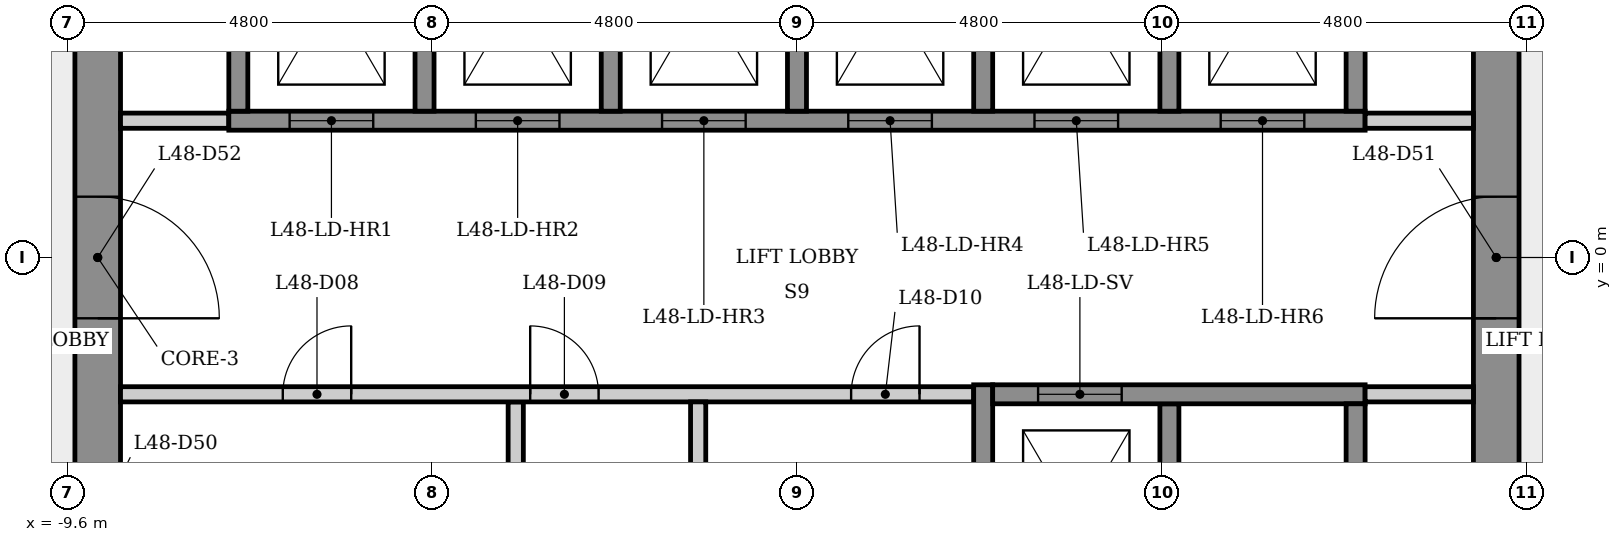
"""IFC4 building model, lengths in metres.
Left out: names, types, materials, properties, quantities, classifications, styles, units other than length and angle.
Written with IfcOpenShell. Run it as: python <this file> out.ifc"""

import sys

from ifc_helpers import new_model, si_unit, direction, frame, frame_2d, origin, place, context, subcontext, project, spatial, rectangle, extrude, element, fill, save


model = new_model("IFC4")
c1 = context("Model", 3, precision=1e-05, world=origin(), true_north=direction((0.0, 1.0)))
c2 = subcontext(c1, "Body", "Model", "MODEL_VIEW")
j1 = project(units=[si_unit("LENGTHUNIT", "METRE"), si_unit("PLANEANGLEUNIT", "RADIAN")], contexts=[c1])
p1 = place(None, origin())
s1 = spatial("IfcSite", under=j1, at=p1, CompositionType="ELEMENT")
p2 = place(p1, origin())
s2 = spatial("IfcBuilding", under=s1, at=p2, CompositionType="ELEMENT")
p3 = place(p2, frame((0.0, 0.0, 179.9)))
s3 = spatial("IfcBuildingStorey", under=s2, at=p3, CompositionType="ELEMENT", Elevation=179.9)
p4 = place(p3, frame((9.2, -5.485, 0.0), z_axis=(0.0, 0.0, 1.0), x_axis=(0.0, 1.0, 0.0)))
e1 = element("IfcWall", 1, at=p4, inside=s3, PredefinedType="SHEAR", context=c2, shape_type="SweptSolid", body=[
    extrude(rectangle(XDim=10.97, YDim=0.6, at=frame_2d((5.485, 0.0))), origin(), (0.0, 0.0, 1.0), 3.4),
])
p5 = place(p4, frame((4.685, 0.0, 0.0)))
e2 = element("IfcOpeningElement", 2, at=p5, cuts=e1, PredefinedType="OPENING", context=c2, shape_type="SweptSolid", body=[
    extrude(rectangle(XDim=1.6, YDim=2.1, at=frame_2d((0.8, 1.05))), frame((0.0, 0.31, 0.0), z_axis=(0.0, -1.0, 0.0), x_axis=(1.0, 0.0, 0.0)), (0.0, 0.0, 1.0), 0.62),
])
p6 = place(p3, frame((-9.2, 5.485, 0.0), z_axis=(0.0, 0.0, 1.0), x_axis=(0.0, -1.0, 0.0)))
e3 = element("IfcWall", 3, at=p6, inside=s3, PredefinedType="SHEAR", context=c2, shape_type="SweptSolid", body=[
    extrude(rectangle(XDim=10.97, YDim=0.6, at=frame_2d((5.485, 0.0))), origin(), (0.0, 0.0, 1.0), 3.4),
])
p7 = place(p6, frame((8.516, 0.0, 0.0)))
e4 = element("IfcOpeningElement", 4, at=p7, cuts=e3, PredefinedType="OPENING", context=c2, shape_type="SweptSolid", body=[
    extrude(rectangle(XDim=0.9, YDim=2.1, at=frame_2d((0.45, 1.05))), frame((0.0, 0.31, 0.0), z_axis=(0.0, -1.0, 0.0), x_axis=(1.0, 0.0, 0.0)), (0.0, 0.0, 1.0), 0.62),
])
p8 = place(p6, frame((4.685, 0.0, 0.0)))
e5 = element("IfcOpeningElement", 5, at=p8, cuts=e3, PredefinedType="OPENING", context=c2, shape_type="SweptSolid", body=[
    extrude(rectangle(XDim=1.6, YDim=2.1, at=frame_2d((0.8, 1.05))), frame((0.0, 0.31, 0.0), z_axis=(0.0, -1.0, 0.0), x_axis=(1.0, 0.0, 0.0)), (0.0, 0.0, 1.0), 0.62),
])
p9 = place(p3, frame((-8.9, 1.8, 0.0), z_axis=(0.0, 0.0, 1.0), x_axis=(1.0, 0.0, 0.0)))
e6 = element("IfcWall", 6, at=p9, inside=s3, PredefinedType="PARTITIONING", context=c2, shape_type="SweptSolid", body=[
    extrude(rectangle(XDim=1.425, YDim=0.2, at=frame_2d((0.712, 0.0))), origin(), (0.0, 0.0, 1.0), 3.05),
])
p10 = place(p3, frame((-7.475, 1.8, 0.0), z_axis=(0.0, 0.0, 1.0), x_axis=(1.0, 0.0, 0.0)))
e7 = element("IfcWall", 7, at=p10, inside=s3, PredefinedType="SHEAR", context=c2, shape_type="SweptSolid", body=[
    extrude(rectangle(XDim=14.95, YDim=0.25, at=frame_2d((7.475, 0.0))), origin(), (0.0, 0.0, 1.0), 3.05),
])
p11 = place(p10, frame((0.8, 0.0, 0.0)))
e8 = element("IfcOpeningElement", 8, at=p11, cuts=e7, PredefinedType="OPENING", context=c2, shape_type="SweptSolid", body=[
    extrude(rectangle(XDim=1.1, YDim=2.1, at=frame_2d((0.55, 1.05))), frame((0.0, 0.135, 0.0), z_axis=(0.0, -1.0, 0.0), x_axis=(1.0, 0.0, 0.0)), (0.0, 0.0, 1.0), 0.27),
])
p12 = place(p10, frame((3.25, 0.0, 0.0)))
e9 = element("IfcOpeningElement", 9, at=p12, cuts=e7, PredefinedType="OPENING", context=c2, shape_type="SweptSolid", body=[
    extrude(rectangle(XDim=1.1, YDim=2.1, at=frame_2d((0.55, 1.05))), frame((0.0, 0.135, 0.0), z_axis=(0.0, -1.0, 0.0), x_axis=(1.0, 0.0, 0.0)), (0.0, 0.0, 1.0), 0.27),
])
p13 = place(p10, frame((5.7, 0.0, 0.0)))
e10 = element("IfcOpeningElement", 10, at=p13, cuts=e7, PredefinedType="OPENING", context=c2, shape_type="SweptSolid", body=[
    extrude(rectangle(XDim=1.1, YDim=2.1, at=frame_2d((0.55, 1.05))), frame((0.0, 0.135, 0.0), z_axis=(0.0, -1.0, 0.0), x_axis=(1.0, 0.0, 0.0)), (0.0, 0.0, 1.0), 0.27),
])
p14 = place(p10, frame((8.15, 0.0, 0.0)))
e11 = element("IfcOpeningElement", 11, at=p14, cuts=e7, PredefinedType="OPENING", context=c2, shape_type="SweptSolid", body=[
    extrude(rectangle(XDim=1.1, YDim=2.1, at=frame_2d((0.55, 1.05))), frame((0.0, 0.135, 0.0), z_axis=(0.0, -1.0, 0.0), x_axis=(1.0, 0.0, 0.0)), (0.0, 0.0, 1.0), 0.27),
])
p15 = place(p10, frame((10.6, 0.0, 0.0)))
e12 = element("IfcOpeningElement", 12, at=p15, cuts=e7, PredefinedType="OPENING", context=c2, shape_type="SweptSolid", body=[
    extrude(rectangle(XDim=1.1, YDim=2.1, at=frame_2d((0.55, 1.05))), frame((0.0, 0.135, 0.0), z_axis=(0.0, -1.0, 0.0), x_axis=(1.0, 0.0, 0.0)), (0.0, 0.0, 1.0), 0.27),
])
p16 = place(p10, frame((13.05, 0.0, 0.0)))
e13 = element("IfcOpeningElement", 13, at=p16, cuts=e7, PredefinedType="OPENING", context=c2, shape_type="SweptSolid", body=[
    extrude(rectangle(XDim=1.1, YDim=2.1, at=frame_2d((0.55, 1.05))), frame((0.0, 0.135, 0.0), z_axis=(0.0, -1.0, 0.0), x_axis=(1.0, 0.0, 0.0)), (0.0, 0.0, 1.0), 0.27),
])
p17 = place(p3, frame((-7.35, 1.925, 0.0), z_axis=(0.0, 0.0, 1.0), x_axis=(0.0, 1.0, 0.0)))
e14 = element("IfcWall", 14, at=p17, inside=s3, PredefinedType="SHEAR", context=c2, shape_type="SweptSolid", body=[
    extrude(rectangle(XDim=4.036, YDim=0.25, at=frame_2d((2.018, 0.0))), origin(), (0.0, 0.0, 1.0), 3.05),
])
p18 = place(p3, frame((-4.9, 5.025, 0.0), z_axis=(0.0, 0.0, 1.0), x_axis=(0.0, -1.0, 0.0)))
e15 = element("IfcWall", 15, at=p18, inside=s3, PredefinedType="SHEAR", context=c2, shape_type="SweptSolid", body=[
    extrude(rectangle(XDim=3.1, YDim=0.25, at=frame_2d((1.55, 0.0))), origin(), (0.0, 0.0, 1.0), 3.4),
])
p19 = place(p3, frame((-3.7, -1.9, 0.0), z_axis=(0.0, 0.0, 1.0), x_axis=(0.0, -1.0, 0.0)))
e16 = element("IfcWall", 16, at=p19, inside=s3, PredefinedType="PARTITIONING", context=c2, shape_type="SweptSolid", body=[
    extrude(rectangle(XDim=3.15, YDim=0.2, at=frame_2d((1.575, 0.0))), origin(), (0.0, 0.0, 1.0), 3.05),
])
p20 = place(p3, frame((-8.9, -1.8, 0.0), z_axis=(0.0, 0.0, 1.0), x_axis=(1.0, 0.0, 0.0)))
e17 = element("IfcWall", 17, at=p20, inside=s3, PredefinedType="PARTITIONING", context=c2, shape_type="SweptSolid", body=[
    extrude(rectangle(XDim=11.225, YDim=0.2, at=frame_2d((5.613, 0.0))), origin(), (0.0, 0.0, 1.0), 3.05),
])
p21 = place(p20, frame((2.135, 0.0, 0.0)))
e18 = element("IfcOpeningElement", 18, at=p21, cuts=e17, PredefinedType="OPENING", context=c2, shape_type="SweptSolid", body=[
    extrude(rectangle(XDim=0.9, YDim=2.1, at=frame_2d((0.45, 1.05))), frame((0.0, 0.11, 0.0), z_axis=(0.0, -1.0, 0.0), x_axis=(1.0, 0.0, 0.0)), (0.0, 0.0, 1.0), 0.22),
])
p22 = place(p20, frame((5.39, 0.0, 0.0)))
e19 = element("IfcOpeningElement", 19, at=p22, cuts=e17, PredefinedType="OPENING", context=c2, shape_type="SweptSolid", body=[
    extrude(rectangle(XDim=0.9, YDim=2.1, at=frame_2d((0.45, 1.05))), frame((0.0, 0.11, 0.0), z_axis=(0.0, -1.0, 0.0), x_axis=(1.0, 0.0, 0.0)), (0.0, 0.0, 1.0), 0.22),
])
p23 = place(p20, frame((9.613, 0.0, 0.0)))
e20 = element("IfcOpeningElement", 20, at=p23, cuts=e17, PredefinedType="OPENING", context=c2, shape_type="SweptSolid", body=[
    extrude(rectangle(XDim=0.9, YDim=2.1, at=frame_2d((0.45, 1.05))), frame((0.0, 0.11, 0.0), z_axis=(0.0, -1.0, 0.0), x_axis=(1.0, 0.0, 0.0)), (0.0, 0.0, 1.0), 0.22),
])
p24 = place(p3, frame((-2.45, 5.025, 0.0), z_axis=(0.0, 0.0, 1.0), x_axis=(0.0, -1.0, 0.0)))
e21 = element("IfcWall", 21, at=p24, inside=s3, PredefinedType="SHEAR", context=c2, shape_type="SweptSolid", body=[
    extrude(rectangle(XDim=3.1, YDim=0.25, at=frame_2d((1.55, 0.0))), origin(), (0.0, 0.0, 1.0), 3.4),
])
p25 = place(p3, frame((-1.3, -1.9, 0.0), z_axis=(0.0, 0.0, 1.0), x_axis=(0.0, -1.0, 0.0)))
e22 = element("IfcWall", 22, at=p25, inside=s3, PredefinedType="PARTITIONING", context=c2, shape_type="SweptSolid", body=[
    extrude(rectangle(XDim=3.15, YDim=0.2, at=frame_2d((1.575, 0.0))), origin(), (0.0, 0.0, 1.0), 3.05),
])
p26 = place(p3, frame((0.0, 5.025, 0.0), z_axis=(0.0, 0.0, 1.0), x_axis=(0.0, -1.0, 0.0)))
e23 = element("IfcWall", 23, at=p26, inside=s3, PredefinedType="SHEAR", context=c2, shape_type="SweptSolid", body=[
    extrude(rectangle(XDim=3.1, YDim=0.25, at=frame_2d((1.55, 0.0))), origin(), (0.0, 0.0, 1.0), 3.4),
])
p27 = place(p3, frame((2.45, -5.275, 0.0), z_axis=(0.0, 0.0, 1.0), x_axis=(0.0, 1.0, 0.0)))
e24 = element("IfcWall", 24, at=p27, inside=s3, PredefinedType="SHEAR", context=c2, shape_type="SweptSolid", body=[
    extrude(rectangle(XDim=3.6, YDim=0.25, at=frame_2d((1.8, 0.0))), origin(), (0.0, 0.0, 1.0), 3.05),
])
for number, where, z_axis, x_axis in (
    (25, (2.45, 5.025, 0.0), (0.0, 0.0, 1.0), (0.0, -1.0, 0.0)),
    (26, (4.9, -1.925, 0.0), (0.0, 0.0, 1.0), (0.0, -1.0, 0.0)),
    (27, (4.9, 5.025, 0.0), (0.0, 0.0, 1.0), (0.0, -1.0, 0.0)),
):
    element("IfcWall", number, at=place(p3, frame(where, z_axis=z_axis, x_axis=x_axis)), inside=s3, PredefinedType="SHEAR", context=c2, shape_type="SweptSolid", body=[
        extrude(rectangle(XDim=3.1, YDim=0.25, at=frame_2d((1.55, 0.0))), origin(), (0.0, 0.0, 1.0), 3.4),
    ])
p28 = place(p3, frame((2.575, -1.8, 0.0), z_axis=(0.0, 0.0, 1.0), x_axis=(1.0, 0.0, 0.0)))
e28 = element("IfcWall", 28, at=p28, inside=s3, PredefinedType="SHEAR", context=c2, shape_type="SweptSolid", body=[
    extrude(rectangle(XDim=4.9, YDim=0.25, at=frame_2d((2.45, 0.0))), origin(), (0.0, 0.0, 1.0), 3.05),
])
p29 = place(p28, frame((0.597, 0.0, 0.0)))
e29 = element("IfcOpeningElement", 29, at=p29, cuts=e28, PredefinedType="OPENING", context=c2, shape_type="SweptSolid", body=[
    extrude(rectangle(XDim=1.1, YDim=2.1, at=frame_2d((0.55, 1.05))), frame((0.0, 0.135, 0.0), z_axis=(0.0, -1.0, 0.0), x_axis=(1.0, 0.0, 0.0)), (0.0, 0.0, 1.0), 0.27),
])
p30 = place(p3, frame((7.475, 1.8, 0.0), z_axis=(0.0, 0.0, 1.0), x_axis=(1.0, 0.0, 0.0)))
e30 = element("IfcWall", 30, at=p30, inside=s3, PredefinedType="PARTITIONING", context=c2, shape_type="SweptSolid", body=[
    extrude(rectangle(XDim=1.425, YDim=0.2, at=frame_2d((0.712, 0.0))), origin(), (0.0, 0.0, 1.0), 3.05),
])
for number, where, z_axis, x_axis in (
    (31, (7.35, -1.925, 0.0), (0.0, 0.0, 1.0), (0.0, -1.0, 0.0)),
    (32, (7.35, 5.025, 0.0), (0.0, 0.0, 1.0), (0.0, -1.0, 0.0)),
):
    element("IfcWall", number, at=place(p3, frame(where, z_axis=z_axis, x_axis=x_axis)), inside=s3, PredefinedType="SHEAR", context=c2, shape_type="SweptSolid", body=[
        extrude(rectangle(XDim=3.1, YDim=0.25, at=frame_2d((1.55, 0.0))), origin(), (0.0, 0.0, 1.0), 3.4),
    ])
p31 = place(p3, frame((8.9, -1.8, 0.0), z_axis=(0.0, 0.0, 1.0), x_axis=(-1.0, 0.0, 0.0)))
e33 = element("IfcWall", 33, at=p31, inside=s3, PredefinedType="PARTITIONING", context=c2, shape_type="SweptSolid", body=[
    extrude(rectangle(XDim=1.425, YDim=0.2, at=frame_2d((0.712, 0.0))), origin(), (0.0, 0.0, 1.0), 3.05),
])
p32 = place(p11, origin())
e34 = element("IfcDoor", 34, at=p32, inside=s3, OperationType="SLIDING_TO_LEFT", PredefinedType="DOOR", context=c2, shape_type="SweptSolid", body=[
    extrude(rectangle(XDim=1.1, YDim=2.1, at=frame_2d((0.55, 1.05))), frame((0.0, 0.025, 0.0), z_axis=(0.0, -1.0, 0.0), x_axis=(1.0, 0.0, 0.0)), (0.0, 0.0, 1.0), 0.05),
])
fill(e8, e34)
p33 = place(p12, origin())
e35 = element("IfcDoor", 35, at=p33, inside=s3, OperationType="SLIDING_TO_LEFT", PredefinedType="DOOR", context=c2, shape_type="SweptSolid", body=[
    extrude(rectangle(XDim=1.1, YDim=2.1, at=frame_2d((0.55, 1.05))), frame((0.0, 0.025, 0.0), z_axis=(0.0, -1.0, 0.0), x_axis=(1.0, 0.0, 0.0)), (0.0, 0.0, 1.0), 0.05),
])
fill(e9, e35)
p34 = place(p13, origin())
e36 = element("IfcDoor", 36, at=p34, inside=s3, OperationType="SLIDING_TO_LEFT", PredefinedType="DOOR", context=c2, shape_type="SweptSolid", body=[
    extrude(rectangle(XDim=1.1, YDim=2.1, at=frame_2d((0.55, 1.05))), frame((0.0, 0.025, 0.0), z_axis=(0.0, -1.0, 0.0), x_axis=(1.0, 0.0, 0.0)), (0.0, 0.0, 1.0), 0.05),
])
fill(e10, e36)
p35 = place(p14, origin())
e37 = element("IfcDoor", 37, at=p35, inside=s3, OperationType="SLIDING_TO_LEFT", PredefinedType="DOOR", context=c2, shape_type="SweptSolid", body=[
    extrude(rectangle(XDim=1.1, YDim=2.1, at=frame_2d((0.55, 1.05))), frame((0.0, 0.025, 0.0), z_axis=(0.0, -1.0, 0.0), x_axis=(1.0, 0.0, 0.0)), (0.0, 0.0, 1.0), 0.05),
])
fill(e11, e37)
p36 = place(p15, origin())
e38 = element("IfcDoor", 38, at=p36, inside=s3, OperationType="SLIDING_TO_LEFT", PredefinedType="DOOR", context=c2, shape_type="SweptSolid", body=[
    extrude(rectangle(XDim=1.1, YDim=2.1, at=frame_2d((0.55, 1.05))), frame((0.0, 0.025, 0.0), z_axis=(0.0, -1.0, 0.0), x_axis=(1.0, 0.0, 0.0)), (0.0, 0.0, 1.0), 0.05),
])
fill(e12, e38)
p37 = place(p16, origin())
e39 = element("IfcDoor", 39, at=p37, inside=s3, OperationType="SLIDING_TO_LEFT", PredefinedType="DOOR", context=c2, shape_type="SweptSolid", body=[
    extrude(rectangle(XDim=1.1, YDim=2.1, at=frame_2d((0.55, 1.05))), frame((0.0, 0.025, 0.0), z_axis=(0.0, -1.0, 0.0), x_axis=(1.0, 0.0, 0.0)), (0.0, 0.0, 1.0), 0.05),
])
fill(e13, e39)
p38 = place(p29, origin())
e40 = element("IfcDoor", 40, at=p38, inside=s3, OperationType="SLIDING_TO_LEFT", PredefinedType="DOOR", context=c2, shape_type="SweptSolid", body=[
    extrude(rectangle(XDim=1.1, YDim=2.1, at=frame_2d((0.55, 1.05))), frame((0.0, 0.025, 0.0), z_axis=(0.0, -1.0, 0.0), x_axis=(1.0, 0.0, 0.0)), (0.0, 0.0, 1.0), 0.05),
])
fill(e29, e40)
p39 = place(p21, origin())
e41 = element("IfcDoor", 41, at=p39, inside=s3, OperationType="SINGLE_SWING_RIGHT", PredefinedType="DOOR", context=c2, shape_type="SweptSolid", body=[
    extrude(rectangle(XDim=0.9, YDim=2.1, at=frame_2d((0.45, 1.05))), frame((0.0, 0.025, 0.0), z_axis=(0.0, -1.0, 0.0), x_axis=(1.0, 0.0, 0.0)), (0.0, 0.0, 1.0), 0.05),
])
fill(e18, e41)
p40 = place(p22, origin())
e42 = element("IfcDoor", 42, at=p40, inside=s3, OperationType="SINGLE_SWING_LEFT", PredefinedType="DOOR", context=c2, shape_type="SweptSolid", body=[
    extrude(rectangle(XDim=0.9, YDim=2.1, at=frame_2d((0.45, 1.05))), frame((0.0, 0.025, 0.0), z_axis=(0.0, -1.0, 0.0), x_axis=(1.0, 0.0, 0.0)), (0.0, 0.0, 1.0), 0.05),
])
fill(e19, e42)
p41 = place(p23, origin())
e43 = element("IfcDoor", 43, at=p41, inside=s3, OperationType="SINGLE_SWING_RIGHT", PredefinedType="DOOR", context=c2, shape_type="SweptSolid", body=[
    extrude(rectangle(XDim=0.9, YDim=2.1, at=frame_2d((0.45, 1.05))), frame((0.0, 0.025, 0.0), z_axis=(0.0, -1.0, 0.0), x_axis=(1.0, 0.0, 0.0)), (0.0, 0.0, 1.0), 0.05),
])
fill(e20, e43)
p42 = place(p5, origin())
e44 = element("IfcDoor", 44, at=p42, inside=s3, OperationType="SINGLE_SWING_LEFT", PredefinedType="DOOR", context=c2, shape_type="SweptSolid", body=[
    extrude(rectangle(XDim=1.6, YDim=2.1, at=frame_2d((0.8, 1.05))), frame((0.0, 0.025, 0.0), z_axis=(0.0, -1.0, 0.0), x_axis=(1.0, 0.0, 0.0)), (0.0, 0.0, 1.0), 0.05),
])
fill(e2, e44)
p43 = place(p8, origin())
e45 = element("IfcDoor", 45, at=p43, inside=s3, OperationType="SINGLE_SWING_RIGHT", PredefinedType="DOOR", context=c2, shape_type="SweptSolid", body=[
    extrude(rectangle(XDim=1.6, YDim=2.1, at=frame_2d((0.8, 1.05))), frame((0.0, 0.025, 0.0), z_axis=(0.0, -1.0, 0.0), x_axis=(1.0, 0.0, 0.0)), (0.0, 0.0, 1.0), 0.05),
])
fill(e5, e45)
save(model, sys.argv[1])
